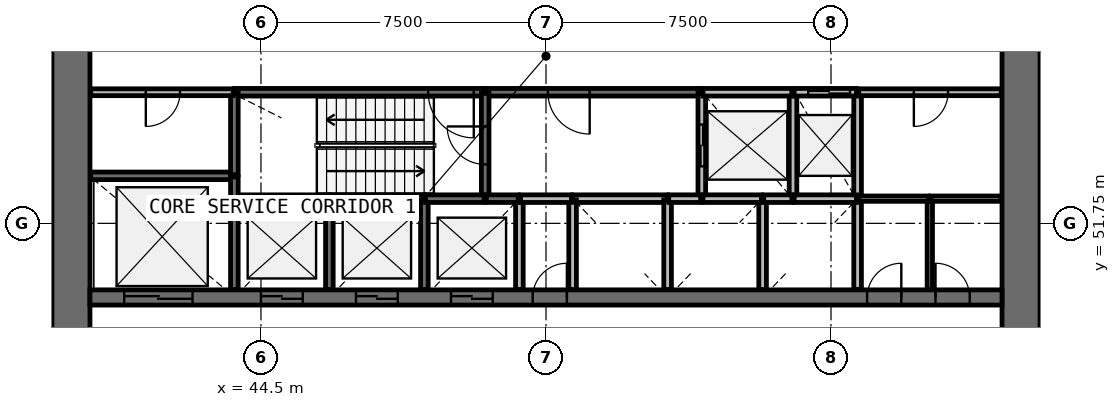
"""IFC4 building model, lengths in metres.
Left out: names, types, materials, properties, quantities, classifications, styles, units other than length and angle.
Written with IfcOpenShell. Run it as: python <this file> out.ifc"""

import sys

from ifc_helpers import new_model, si_unit, direction, frame, frame_2d, origin, place, context, subcontext, project, spatial, rectangle, extrude, source, transform, mapped, element, fill, save


model = new_model("IFC4")
c1 = context("Model", 3, precision=1e-05, world=origin(), true_north=direction((0.0, 1.0)))
c2 = subcontext(c1, "Body", "Model", "MODEL_VIEW")
j1 = project(units=[si_unit("LENGTHUNIT", "METRE"), si_unit("PLANEANGLEUNIT", "RADIAN")], contexts=[c1])
p1 = place(None, origin())
s1 = spatial("IfcSite", under=j1, at=p1, CompositionType="ELEMENT")
p2 = place(p1, origin())
s2 = spatial("IfcBuilding", under=s1, at=p2, CompositionType="ELEMENT")
p3 = place(p2, frame((0.0, 0.0, 13.8)))
s3 = spatial("IfcBuildingStorey", under=s2, at=p3, CompositionType="ELEMENT", Elevation=13.8)
p4 = place(p3, frame((64.5, 38.0, 0.0), z_axis=(0.0, 0.0, 1.0), x_axis=(0.0, 1.0, 0.0)))
e1 = element("IfcWall", 1, at=p4, inside=s3, PredefinedType="SHEAR", context=c2, shape_type="SweptSolid", body=[
    extrude(rectangle(XDim=20.0, YDim=1.0, at=frame_2d((10.0, 0.0))), origin(), (0.0, 0.0, 1.0), 4.4),
])
p5 = place(p4, frame((9.1, 0.0, 0.0)))
e2 = element("IfcOpeningElement", 2, at=p5, cuts=e1, PredefinedType="OPENING", context=c2, shape_type="SweptSolid", body=[
    extrude(rectangle(XDim=1.8, YDim=2.1, at=frame_2d((0.9, 1.05))), frame((0.0, 0.51, 0.0), z_axis=(0.0, -1.0, 0.0), x_axis=(1.0, 0.0, 0.0)), (0.0, 0.0, 1.0), 1.02),
])
p6 = place(p3, frame((39.5, 58.0, 0.0), z_axis=(0.0, 0.0, 1.0), x_axis=(0.0, -1.0, 0.0)))
e3 = element("IfcWall", 3, at=p6, inside=s3, PredefinedType="SHEAR", context=c2, shape_type="SweptSolid", body=[
    extrude(rectangle(XDim=20.0, YDim=1.0, at=frame_2d((10.0, 0.0))), origin(), (0.0, 0.0, 1.0), 4.4),
])
p7 = place(p6, frame((9.1, 0.0, 0.0)))
e4 = element("IfcOpeningElement", 4, at=p7, cuts=e3, PredefinedType="OPENING", context=c2, shape_type="SweptSolid", body=[
    extrude(rectangle(XDim=1.8, YDim=2.1, at=frame_2d((0.9, 1.05))), frame((0.0, 0.51, 0.0), z_axis=(0.0, -1.0, 0.0), x_axis=(1.0, 0.0, 0.0)), (0.0, 0.0, 1.0), 1.02),
])
p8 = place(p3, frame((40.0, 49.8, 0.0), z_axis=(0.0, 0.0, 1.0), x_axis=(1.0, 0.0, 0.0)))
e5 = element("IfcWall", 5, at=p8, inside=s3, PredefinedType="SHEAR", context=c2, shape_type="SweptSolid", body=[
    extrude(rectangle(XDim=24.0, YDim=0.4, at=frame_2d((12.0, 0.0))), origin(), (0.0, 0.0, 1.0), 4.4),
])
p9 = place(p8, frame((4.5, 0.0, 0.0)))
e6 = element("IfcOpeningElement", 6, at=p9, cuts=e5, PredefinedType="OPENING", context=c2, shape_type="SweptSolid", body=[
    extrude(rectangle(XDim=1.1, YDim=2.1, at=frame_2d((0.55, 1.05))), frame((0.0, 0.21, 0.0), z_axis=(0.0, -1.0, 0.0), x_axis=(1.0, 0.0, 0.0)), (0.0, 0.0, 1.0), 0.42),
])
p10 = place(p8, frame((7.0, 0.0, 0.0)))
e7 = element("IfcOpeningElement", 7, at=p10, cuts=e5, PredefinedType="OPENING", context=c2, shape_type="SweptSolid", body=[
    extrude(rectangle(XDim=1.1, YDim=2.1, at=frame_2d((0.55, 1.05))), frame((0.0, 0.21, 0.0), z_axis=(0.0, -1.0, 0.0), x_axis=(1.0, 0.0, 0.0)), (0.0, 0.0, 1.0), 0.42),
])
p11 = place(p8, frame((9.5, 0.0, 0.0)))
e8 = element("IfcOpeningElement", 8, at=p11, cuts=e5, PredefinedType="OPENING", context=c2, shape_type="SweptSolid", body=[
    extrude(rectangle(XDim=1.1, YDim=2.1, at=frame_2d((0.55, 1.05))), frame((0.0, 0.21, 0.0), z_axis=(0.0, -1.0, 0.0), x_axis=(1.0, 0.0, 0.0)), (0.0, 0.0, 1.0), 0.42),
])
p12 = place(p8, frame((0.9, 0.0, 0.0)))
e9 = element("IfcOpeningElement", 9, at=p12, cuts=e5, PredefinedType="OPENING", context=c2, shape_type="SweptSolid", body=[
    extrude(rectangle(XDim=1.8, YDim=2.4, at=frame_2d((0.9, 1.2))), frame((0.0, 0.21, 0.0), z_axis=(0.0, -1.0, 0.0), x_axis=(1.0, 0.0, 0.0)), (0.0, 0.0, 1.0), 0.42),
])
p13 = place(p8, frame((20.45, 0.0, 0.0)))
e10 = element("IfcOpeningElement", 10, at=p13, cuts=e5, PredefinedType="OPENING", context=c2, shape_type="SweptSolid", body=[
    extrude(rectangle(XDim=0.9, YDim=2.1, at=frame_2d((0.45, 1.05))), frame((0.0, 0.21, 0.0), z_axis=(0.0, -1.0, 0.0), x_axis=(1.0, 0.0, 0.0)), (0.0, 0.0, 1.0), 0.42),
])
p14 = place(p8, frame((22.25, 0.0, 0.0)))
e11 = element("IfcOpeningElement", 11, at=p14, cuts=e5, PredefinedType="OPENING", context=c2, shape_type="SweptSolid", body=[
    extrude(rectangle(XDim=0.9, YDim=2.1, at=frame_2d((0.45, 1.05))), frame((0.0, 0.21, 0.0), z_axis=(0.0, -1.0, 0.0), x_axis=(1.0, 0.0, 0.0)), (0.0, 0.0, 1.0), 0.42),
])
p15 = place(p8, frame((11.65, 0.0, 0.0)))
e12 = element("IfcOpeningElement", 12, at=p15, cuts=e5, PredefinedType="OPENING", context=c2, shape_type="SweptSolid", body=[
    extrude(rectangle(XDim=0.9, YDim=2.1, at=frame_2d((0.45, 1.05))), frame((0.0, 0.21, 0.0), z_axis=(0.0, -1.0, 0.0), x_axis=(1.0, 0.0, 0.0)), (0.0, 0.0, 1.0), 0.42),
])
p16 = place(p3, frame((50.4, 55.2, 0.0), z_axis=(0.0, 0.0, 1.0), x_axis=(-1.0, 0.0, 0.0)))
e13 = element("IfcWall", 13, at=p16, inside=s3, PredefinedType="SOLIDWALL", context=c2, shape_type="SweptSolid", body=[
    extrude(rectangle(XDim=6.6, YDim=0.2, at=frame_2d((3.3, 0.0))), origin(), (0.0, 0.0, 1.0), 4.05),
])
p17 = place(p16, frame((0.3, 0.0, 0.0)))
e14 = element("IfcOpeningElement", 14, at=p17, cuts=e13, PredefinedType="OPENING", context=c2, shape_type="SweptSolid", body=[
    extrude(rectangle(XDim=1.2, YDim=2.1, at=frame_2d((0.6, 1.05))), frame((0.0, 0.11, 0.0), z_axis=(0.0, -1.0, 0.0), x_axis=(1.0, 0.0, 0.0)), (0.0, 0.0, 1.0), 0.22),
])
p18 = place(p3, frame((56.1, 55.2, 0.0), z_axis=(0.0, 0.0, 1.0), x_axis=(-1.0, 0.0, 0.0)))
e15 = element("IfcWall", 15, at=p18, inside=s3, PredefinedType="SOLIDWALL", context=c2, shape_type="SweptSolid", body=[
    extrude(rectangle(XDim=5.67, YDim=0.2, at=frame_2d((2.835, 0.0))), origin(), (0.0, 0.0, 1.0), 4.05),
])
p19 = place(p18, frame((2.95, 0.0, 0.0)))
e16 = element("IfcOpeningElement", 16, at=p19, cuts=e15, PredefinedType="OPENING", context=c2, shape_type="SweptSolid", body=[
    extrude(rectangle(XDim=1.1, YDim=2.1, at=frame_2d((0.55, 1.05))), frame((0.0, 0.11, 0.0), z_axis=(0.0, -1.0, 0.0), x_axis=(1.0, 0.0, 0.0)), (0.0, 0.0, 1.0), 0.22),
])
p20 = place(p3, frame((43.8, 53.0, 0.0), z_axis=(0.0, 0.0, 1.0), x_axis=(-1.0, 0.0, 0.0)))
e17 = element("IfcWall", 17, at=p20, inside=s3, PredefinedType="SOLIDWALL", context=c2, shape_type="SweptSolid", body=[
    extrude(rectangle(XDim=3.78, YDim=0.2, at=frame_2d((1.89, 0.0))), origin(), (0.0, 0.0, 1.0), 4.05),
])
p21 = place(p3, frame((50.4, 52.4, 0.0), z_axis=(0.0, 0.0, 1.0), x_axis=(0.0, 1.0, 0.0)))
e18 = element("IfcWall", 18, at=p21, inside=s3, PredefinedType="SOLIDWALL", context=c2, shape_type="SweptSolid", body=[
    extrude(rectangle(XDim=2.77, YDim=0.2, at=frame_2d((1.385, 0.0))), origin(), (0.0, 0.0, 1.0), 4.05),
])
p22 = place(p21, frame((0.9, 0.0, 0.0)))
e19 = element("IfcOpeningElement", 19, at=p22, cuts=e18, PredefinedType="OPENING", context=c2, shape_type="SweptSolid", body=[
    extrude(rectangle(XDim=1.0, YDim=2.1, at=frame_2d((0.5, 1.05))), frame((0.0, 0.11, 0.0), z_axis=(0.0, -1.0, 0.0), x_axis=(1.0, 0.0, 0.0)), (0.0, 0.0, 1.0), 0.22),
])
p23 = place(p3, frame((56.1, 55.17, 0.0), z_axis=(0.0, 0.0, 1.0), x_axis=(0.0, -1.0, 0.0)))
e20 = element("IfcWall", 20, at=p23, inside=s3, PredefinedType="SOLIDWALL", context=c2, shape_type="SweptSolid", body=[
    extrude(rectangle(XDim=2.77, YDim=0.2, at=frame_2d((1.385, 0.0))), origin(), (0.0, 0.0, 1.0), 4.05),
])
p24 = place(p23, frame((0.82, 0.0, 0.0)))
e21 = element("IfcOpeningElement", 21, at=p24, cuts=e20, PredefinedType="OPENING", context=c2, shape_type="SweptSolid", body=[
    extrude(rectangle(XDim=1.1, YDim=2.1, at=frame_2d((0.55, 1.05))), frame((0.0, 0.11, 0.0), z_axis=(0.0, -1.0, 0.0), x_axis=(1.0, 0.0, 0.0)), (0.0, 0.0, 1.0), 0.22),
])
for number, where, z_axis, x_axis in (
    (22, (58.5, 52.4, 0.0), (0.0, 0.0, 1.0), (0.0, 1.0, 0.0)),
    (23, (60.2, 52.4, 0.0), (0.0, 0.0, 1.0), (0.0, 1.0, 0.0)),
):
    element("IfcWall", number, at=place(p3, frame(where, z_axis=z_axis, x_axis=x_axis)), inside=s3, PredefinedType="SOLIDWALL", context=c2, shape_type="SweptSolid", body=[
        extrude(rectangle(XDim=2.8, YDim=0.2, at=frame_2d((1.4, 0.0))), origin(), (0.0, 0.0, 1.0), 4.05),
    ])
p25 = place(p3, frame((46.3, 52.4, 0.0), z_axis=(0.0, 0.0, 1.0), x_axis=(-1.0, 0.0, 0.0)))
e24 = element("IfcWall", 24, at=p25, inside=s3, PredefinedType="SOLIDWALL", context=c2, shape_type="SweptSolid", body=[
    extrude(rectangle(XDim=2.5, YDim=0.2, at=frame_2d((1.25, 0.0))), origin(), (0.0, 0.0, 1.0), 4.05),
])
p26 = place(p3, frame((48.8, 52.4, 0.0), z_axis=(0.0, 0.0, 1.0), x_axis=(-1.0, 0.0, 0.0)))
e25 = element("IfcWall", 25, at=p26, inside=s3, PredefinedType="SOLIDWALL", context=c2, shape_type="SweptSolid", body=[
    extrude(rectangle(XDim=2.47, YDim=0.2, at=frame_2d((1.235, 0.0))), origin(), (0.0, 0.0, 1.0), 4.05),
])
p27 = place(p3, frame((55.2, 52.4, 0.0), z_axis=(0.0, 0.0, 1.0), x_axis=(-1.0, 0.0, 0.0)))
e26 = element("IfcWall", 26, at=p27, inside=s3, PredefinedType="SOLIDWALL", context=c2, shape_type="SweptSolid", body=[
    extrude(rectangle(XDim=2.5, YDim=0.2, at=frame_2d((1.25, 0.0))), origin(), (0.0, 0.0, 1.0), 4.05),
])
p28 = place(p3, frame((58.47, 55.2, 0.0), z_axis=(0.0, 0.0, 1.0), x_axis=(-1.0, 0.0, 0.0)))
e27 = element("IfcWall", 27, at=p28, inside=s3, PredefinedType="SOLIDWALL", context=c2, shape_type="SweptSolid", body=[
    extrude(rectangle(XDim=2.34, YDim=0.2, at=frame_2d((1.17, 0.0))), origin(), (0.0, 0.0, 1.0), 4.05),
])
for number, where, z_axis, x_axis in (
    (28, (43.8, 52.37, 0.0), (0.0, 0.0, 1.0), (0.0, -1.0, 0.0)),
    (29, (46.3, 50.01, 0.0), (0.0, 0.0, 1.0), (0.0, 1.0, 0.0)),
    (30, (48.8, 50.01, 0.0), (0.0, 0.0, 1.0), (0.0, 1.0, 0.0)),
):
    element("IfcWall", number, at=place(p3, frame(where, z_axis=z_axis, x_axis=x_axis)), inside=s3, PredefinedType="SOLIDWALL", context=c2, shape_type="SweptSolid", body=[
        extrude(rectangle(XDim=2.36, YDim=0.2, at=frame_2d((1.18, 0.0))), origin(), (0.0, 0.0, 1.0), 4.05),
    ])
p29 = place(p3, frame((51.3, 50.01, 0.0), z_axis=(0.0, 0.0, 1.0), x_axis=(0.0, 1.0, 0.0)))
e31 = element("IfcWall", 31, at=p29, inside=s3, PredefinedType="SOLIDWALL", context=c2, shape_type="SweptSolid", body=[
    extrude(rectangle(XDim=2.39, YDim=0.2, at=frame_2d((1.195, 0.0))), origin(), (0.0, 0.0, 1.0), 4.05),
])
for number, where, z_axis, x_axis in (
    (32, (52.7, 52.37, 0.0), (0.0, 0.0, 1.0), (0.0, -1.0, 0.0)),
    (33, (55.2, 50.01, 0.0), (0.0, 0.0, 1.0), (0.0, 1.0, 0.0)),
):
    element("IfcWall", number, at=place(p3, frame(where, z_axis=z_axis, x_axis=x_axis)), inside=s3, PredefinedType="SOLIDWALL", context=c2, shape_type="SweptSolid", body=[
        extrude(rectangle(XDim=2.36, YDim=0.2, at=frame_2d((1.18, 0.0))), origin(), (0.0, 0.0, 1.0), 4.05),
    ])
p30 = place(p3, frame((57.7, 50.01, 0.0), z_axis=(0.0, 0.0, 1.0), x_axis=(0.0, 1.0, 0.0)))
e34 = element("IfcWall", 34, at=p30, inside=s3, PredefinedType="SOLIDWALL", context=c2, shape_type="SweptSolid", body=[
    extrude(rectangle(XDim=2.39, YDim=0.2, at=frame_2d((1.195, 0.0))), origin(), (0.0, 0.0, 1.0), 4.05),
])
p31 = place(p3, frame((60.2, 50.01, 0.0), z_axis=(0.0, 0.0, 1.0), x_axis=(0.0, 1.0, 0.0)))
e35 = element("IfcWall", 35, at=p31, inside=s3, PredefinedType="SOLIDWALL", context=c2, shape_type="SweptSolid", body=[
    extrude(rectangle(XDim=2.36, YDim=0.2, at=frame_2d((1.18, 0.0))), origin(), (0.0, 0.0, 1.0), 4.05),
])
p32 = place(p3, frame((43.8, 55.17, 0.0), z_axis=(0.0, 0.0, 1.0), x_axis=(0.0, -1.0, 0.0)))
e36 = element("IfcWall", 36, at=p32, inside=s3, PredefinedType="SOLIDWALL", context=c2, shape_type="SweptSolid", body=[
    extrude(rectangle(XDim=2.14, YDim=0.2, at=frame_2d((1.07, 0.0))), origin(), (0.0, 0.0, 1.0), 4.05),
])
p33 = place(p3, frame((60.17, 52.4, 0.0), z_axis=(0.0, 0.0, 1.0), x_axis=(-1.0, 0.0, 0.0)))
e37 = element("IfcWall", 37, at=p33, inside=s3, PredefinedType="SOLIDWALL", context=c2, shape_type="SweptSolid", body=[
    extrude(rectangle(XDim=1.64, YDim=0.2, at=frame_2d((0.82, 0.0))), origin(), (0.0, 0.0, 1.0), 4.05),
])
p34 = place(p3, frame((60.17, 55.2, 0.0), z_axis=(0.0, 0.0, 1.0), x_axis=(-1.0, 0.0, 0.0)))
e38 = element("IfcWall", 38, at=p34, inside=s3, PredefinedType="SOLIDWALL", context=c2, shape_type="SweptSolid", body=[
    extrude(rectangle(XDim=1.64, YDim=0.2, at=frame_2d((0.82, 0.0))), origin(), (0.0, 0.0, 1.0), 4.05),
])
p35 = place(p34, frame((0.17, 0.0, 0.0)))
e39 = element("IfcOpeningElement", 39, at=p35, cuts=e38, PredefinedType="OPENING", context=c2, shape_type="SweptSolid", body=[
    extrude(rectangle(XDim=1.1, YDim=2.1, at=frame_2d((0.55, 1.05))), frame((0.0, 0.11, 0.0), z_axis=(0.0, -1.0, 0.0), x_axis=(1.0, 0.0, 0.0)), (0.0, 0.0, 1.0), 0.22),
])
for number, where, z_axis, x_axis in (
    (40, (50.37, 52.4, 0.0), (0.0, 0.0, 1.0), (-1.0, 0.0, 0.0)),
    (41, (57.67, 52.4, 0.0), (0.0, 0.0, 1.0), (-1.0, 0.0, 0.0)),
):
    element("IfcWall", number, at=place(p3, frame(where, z_axis=z_axis, x_axis=x_axis)), inside=s3, PredefinedType="SOLIDWALL", context=c2, shape_type="SweptSolid", body=[
        extrude(rectangle(XDim=1.54, YDim=0.2, at=frame_2d((0.77, 0.0))), origin(), (0.0, 0.0, 1.0), 4.05),
    ])
p36 = place(p3, frame((51.33, 52.4, 0.0), z_axis=(0.0, 0.0, 1.0), x_axis=(1.0, 0.0, 0.0)))
e42 = element("IfcWall", 42, at=p36, inside=s3, PredefinedType="SOLIDWALL", context=c2, shape_type="SweptSolid", body=[
    extrude(rectangle(XDim=1.34, YDim=0.2, at=frame_2d((0.67, 0.0))), origin(), (0.0, 0.0, 1.0), 4.05),
])
for number, where, z_axis, x_axis in (
    (43, (51.27, 52.4, 0.0), (0.0, 0.0, 1.0), (-1.0, 0.0, 0.0)),
    (44, (56.07, 52.4, 0.0), (0.0, 0.0, 1.0), (-1.0, 0.0, 0.0)),
):
    element("IfcWall", number, at=place(p3, frame(where, z_axis=z_axis, x_axis=x_axis)), inside=s3, PredefinedType="SOLIDWALL", context=c2, shape_type="SweptSolid", body=[
        extrude(rectangle(XDim=0.84, YDim=0.2, at=frame_2d((0.42, 0.0))), origin(), (0.0, 0.0, 1.0), 4.05),
    ])
p37 = place(p3, frame((58.47, 52.4, 0.0), z_axis=(0.0, 0.0, 1.0), x_axis=(-1.0, 0.0, 0.0)))
e45 = element("IfcWall", 45, at=p37, inside=s3, PredefinedType="SOLIDWALL", context=c2, shape_type="SweptSolid", body=[
    extrude(rectangle(XDim=0.74, YDim=0.2, at=frame_2d((0.37, 0.0))), origin(), (0.0, 0.0, 1.0), 4.05),
])
p38 = place(p3, frame((43.8, 52.43, 0.0), z_axis=(0.0, 0.0, 1.0), x_axis=(0.0, 1.0, 0.0)))
e46 = element("IfcWall", 46, at=p38, inside=s3, PredefinedType="SOLIDWALL", context=c2, shape_type="SweptSolid", body=[
    extrude(rectangle(XDim=0.54, YDim=0.2, at=frame_2d((0.27, 0.0))), origin(), (0.0, 0.0, 1.0), 4.05),
])
p39 = place(p3, frame((43.77, 55.2, 0.0), z_axis=(0.0, 0.0, 1.0), x_axis=(-1.0, 0.0, 0.0)))
e47 = element("IfcWall", 47, at=p39, inside=s3, PredefinedType="PARTITIONING", context=c2, shape_type="SweptSolid", body=[
    extrude(rectangle(XDim=3.75, YDim=0.18, at=frame_2d((1.875, 0.0))), origin(), (0.0, 0.0, 1.0), 4.05),
])
p40 = place(p39, frame((1.4, 0.0, 0.0)))
e48 = element("IfcOpeningElement", 48, at=p40, cuts=e47, PredefinedType="OPENING", context=c2, shape_type="SweptSolid", body=[
    extrude(rectangle(XDim=0.9, YDim=2.1, at=frame_2d((0.45, 1.05))), frame((0.0, 0.1, 0.0), z_axis=(0.0, -1.0, 0.0), x_axis=(1.0, 0.0, 0.0)), (0.0, 0.0, 1.0), 0.2),
])
p41 = place(p3, frame((63.98, 55.2, 0.0), z_axis=(0.0, 0.0, 1.0), x_axis=(-1.0, 0.0, 0.0)))
e49 = element("IfcWall", 49, at=p41, inside=s3, PredefinedType="PARTITIONING", context=c2, shape_type="SweptSolid", body=[
    extrude(rectangle(XDim=3.75, YDim=0.18, at=frame_2d((1.875, 0.0))), origin(), (0.0, 0.0, 1.0), 4.05),
])
p42 = place(p41, frame((1.4, 0.0, 0.0)))
e50 = element("IfcOpeningElement", 50, at=p42, cuts=e49, PredefinedType="OPENING", context=c2, shape_type="SweptSolid", body=[
    extrude(rectangle(XDim=0.9, YDim=2.1, at=frame_2d((0.45, 1.05))), frame((0.0, 0.1, 0.0), z_axis=(0.0, -1.0, 0.0), x_axis=(1.0, 0.0, 0.0)), (0.0, 0.0, 1.0), 0.2),
])
p43 = place(p3, frame((62.1, 50.01, 0.0), z_axis=(0.0, 0.0, 1.0), x_axis=(0.0, 1.0, 0.0)))
e51 = element("IfcWall", 51, at=p43, inside=s3, PredefinedType="PARTITIONING", context=c2, shape_type="SweptSolid", body=[
    extrude(rectangle(XDim=2.39, YDim=0.14, at=frame_2d((1.195, 0.0))), origin(), (0.0, 0.0, 1.0), 3.25),
])
p44 = place(p3, frame((62.07, 52.4, 0.0), z_axis=(0.0, 0.0, 1.0), x_axis=(-1.0, 0.0, 0.0)))
e52 = element("IfcWall", 52, at=p44, inside=s3, PredefinedType="PARTITIONING", context=c2, shape_type="SweptSolid", body=[
    extrude(rectangle(XDim=1.84, YDim=0.14, at=frame_2d((0.92, 0.0))), origin(), (0.0, 0.0, 1.0), 3.25),
])
p45 = place(p3, frame((63.98, 52.4, 0.0), z_axis=(0.0, 0.0, 1.0), x_axis=(-1.0, 0.0, 0.0)))
e53 = element("IfcWall", 53, at=p45, inside=s3, PredefinedType="PARTITIONING", context=c2, shape_type="SweptSolid", body=[
    extrude(rectangle(XDim=1.85, YDim=0.14, at=frame_2d((0.925, 0.0))), origin(), (0.0, 0.0, 1.0), 3.25),
])
m1 = source(origin(), c2, "Body", "SweptSolid", [
    extrude(rectangle(XDim=1.1, YDim=2.1, at=frame_2d((0.55, 1.05))), frame((0.0, 0.025, 0.0), z_axis=(0.0, -1.0, 0.0), x_axis=(1.0, 0.0, 0.0)), (0.0, 0.0, 1.0), 0.05),
])
p46 = place(p9, origin())
e54 = element("IfcDoor", 54, at=p46, inside=s3, OperationType="DOUBLE_DOOR_SLIDING", PredefinedType="USERDEFINED", context=c2, shape_type="MappedRepresentation", body=[
    mapped(m1, transform((0.0, 0.0, 0.0), scale=1.0)),
])
fill(e6, e54)
p47 = place(p10, origin())
e55 = element("IfcDoor", 55, at=p47, inside=s3, OperationType="DOUBLE_DOOR_SLIDING", PredefinedType="USERDEFINED", context=c2, shape_type="MappedRepresentation", body=[
    mapped(m1, transform((0.0, 0.0, 0.0), scale=1.0)),
])
fill(e7, e55)
p48 = place(p11, origin())
e56 = element("IfcDoor", 56, at=p48, inside=s3, OperationType="DOUBLE_DOOR_SLIDING", PredefinedType="USERDEFINED", context=c2, shape_type="MappedRepresentation", body=[
    mapped(m1, transform((0.0, 0.0, 0.0), scale=1.0)),
])
fill(e8, e56)
p49 = place(p24, origin())
e57 = element("IfcDoor", 57, at=p49, inside=s3, OperationType="DOUBLE_DOOR_SLIDING", PredefinedType="USERDEFINED", context=c2, shape_type="MappedRepresentation", body=[
    mapped(m1, transform((0.0, 0.0, 0.0), scale=1.0)),
])
fill(e21, e57)
p50 = place(p35, origin())
e58 = element("IfcDoor", 58, at=p50, inside=s3, OperationType="DOUBLE_DOOR_SLIDING", PredefinedType="USERDEFINED", context=c2, shape_type="MappedRepresentation", body=[
    mapped(m1, transform((0.0, 0.0, 0.0), scale=1.0)),
])
fill(e39, e58)
m2 = source(origin(), c2, "Body", "SweptSolid", [
    extrude(rectangle(XDim=1.8, YDim=2.4, at=frame_2d((0.9, 1.2))), frame((0.0, 0.025, 0.0), z_axis=(0.0, -1.0, 0.0), x_axis=(1.0, 0.0, 0.0)), (0.0, 0.0, 1.0), 0.05),
])
p51 = place(p12, origin())
e59 = element("IfcDoor", 59, at=p51, inside=s3, OperationType="DOUBLE_DOOR_SLIDING", PredefinedType="USERDEFINED", context=c2, shape_type="MappedRepresentation", body=[
    mapped(m2, transform((0.0, 0.0, 0.0), scale=1.0)),
])
fill(e9, e59)
m3 = source(origin(), c2, "Body", "SweptSolid", [
    extrude(rectangle(XDim=1.2, YDim=2.1, at=frame_2d((0.6, 1.05))), frame((0.0, 0.025, 0.0), z_axis=(0.0, -1.0, 0.0), x_axis=(1.0, 0.0, 0.0)), (0.0, 0.0, 1.0), 0.05),
])
p52 = place(p17, origin())
e60 = element("IfcDoor", 60, at=p52, inside=s3, OperationType="SINGLE_SWING_LEFT", PredefinedType="DOOR", context=c2, shape_type="MappedRepresentation", body=[
    mapped(m3, transform((0.0, 0.0, 0.0), scale=1.0)),
])
fill(e14, e60)
m4 = source(origin(), c2, "Body", "SweptSolid", [
    extrude(rectangle(XDim=1.0, YDim=2.1, at=frame_2d((0.5, 1.05))), frame((0.0, 0.025, 0.0), z_axis=(0.0, -1.0, 0.0), x_axis=(1.0, 0.0, 0.0)), (0.0, 0.0, 1.0), 0.05),
])
p53 = place(p22, origin())
e61 = element("IfcDoor", 61, at=p53, inside=s3, OperationType="SINGLE_SWING_RIGHT", PredefinedType="DOOR", context=c2, shape_type="MappedRepresentation", body=[
    mapped(m4, transform((0.0, 0.0, 0.0), scale=1.0)),
])
fill(e19, e61)
m5 = source(origin(), c2, "Body", "SweptSolid", [
    extrude(rectangle(XDim=1.1, YDim=2.1, at=frame_2d((0.55, 1.05))), frame((0.0, 0.025, 0.0), z_axis=(0.0, -1.0, 0.0), x_axis=(1.0, 0.0, 0.0)), (0.0, 0.0, 1.0), 0.05),
])
p54 = place(p19, origin())
e62 = element("IfcDoor", 62, at=p54, inside=s3, OperationType="SINGLE_SWING_LEFT", PredefinedType="DOOR", context=c2, shape_type="MappedRepresentation", body=[
    mapped(m5, transform((0.0, 0.0, 0.0), scale=1.0)),
])
fill(e16, e62)
m6 = source(origin(), c2, "Body", "SweptSolid", [
    extrude(rectangle(XDim=0.9, YDim=2.1, at=frame_2d((0.45, 1.05))), frame((0.0, 0.025, 0.0), z_axis=(0.0, -1.0, 0.0), x_axis=(1.0, 0.0, 0.0)), (0.0, 0.0, 1.0), 0.05),
])
p55 = place(p40, origin())
e63 = element("IfcDoor", 63, at=p55, inside=s3, OperationType="SINGLE_SWING_RIGHT", PredefinedType="DOOR", context=c2, shape_type="MappedRepresentation", body=[
    mapped(m6, transform((0.0, 0.0, 0.0), scale=1.0)),
])
fill(e48, e63)
p56 = place(p13, origin())
e64 = element("IfcDoor", 64, at=p56, inside=s3, OperationType="SINGLE_SWING_RIGHT", PredefinedType="DOOR", context=c2, shape_type="MappedRepresentation", body=[
    mapped(m6, transform((0.0, 0.0, 0.0), scale=1.0)),
])
fill(e10, e64)
p57 = place(p14, origin())
e65 = element("IfcDoor", 65, at=p57, inside=s3, OperationType="SINGLE_SWING_LEFT", PredefinedType="DOOR", context=c2, shape_type="MappedRepresentation", body=[
    mapped(m6, transform((0.0, 0.0, 0.0), scale=1.0)),
])
fill(e11, e65)
p58 = place(p42, origin())
e66 = element("IfcDoor", 66, at=p58, inside=s3, OperationType="SINGLE_SWING_RIGHT", PredefinedType="DOOR", context=c2, shape_type="MappedRepresentation", body=[
    mapped(m6, transform((0.0, 0.0, 0.0), scale=1.0)),
])
fill(e50, e66)
p59 = place(p15, origin())
e67 = element("IfcDoor", 67, at=p59, inside=s3, OperationType="SINGLE_SWING_RIGHT", PredefinedType="DOOR", context=c2, shape_type="MappedRepresentation", body=[
    mapped(m6, transform((0.0, 0.0, 0.0), scale=1.0)),
])
fill(e12, e67)
save(model, sys.argv[1])
